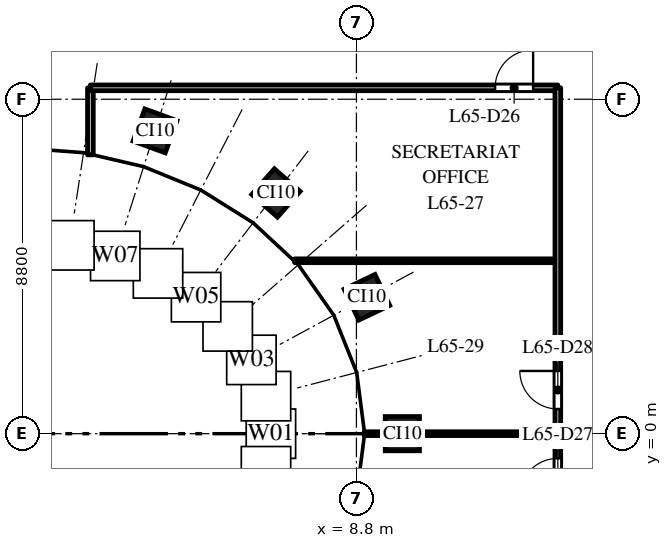
"""IFC4 building model, lengths in metres.
Left out: names, types, materials, properties, quantities, classifications, styles, units other than length and angle.
Written with IfcOpenShell. Run it as: python <this file> out.ifc"""

import sys

from ifc_helpers import new_model, si_unit, direction, frame, frame_2d, origin, origin_2d, place, context, subcontext, project, spatial, rectangle, extrude, element, fill, save


model = new_model("IFC4")
c1 = context("Model", 3, precision=1e-05, world=origin(), true_north=direction((0.0, 1.0)))
c2 = subcontext(c1, "Body", "Model", "MODEL_VIEW")
j1 = project(units=[si_unit("LENGTHUNIT", "METRE"), si_unit("PLANEANGLEUNIT", "RADIAN")], contexts=[c1])
p1 = place(None, origin())
s1 = spatial("IfcSite", under=j1, at=p1, CompositionType="ELEMENT")
p2 = place(p1, origin())
s2 = spatial("IfcBuilding", under=s1, at=p2, CompositionType="ELEMENT")
p3 = place(p2, frame((0.0, 0.0, 303.0)))
s3 = spatial("IfcBuildingStorey", under=s2, at=p3, CompositionType="ELEMENT", Elevation=303.0)
for number, where, z_axis, x_axis in (
    (1, (10.008, 0.0, 0.0), (0.0, 0.0, 1.0), (0.0, 1.0, 0.0)),
    (2, (9.076, 3.588, 0.0), (0.0, 0.0, 1.0), (-0.429, 0.903, 0.0)),
    (3, (6.682, 6.334, 0.0), (0.0, 0.0, 1.0), (-0.751, 0.66, 0.0)),
    (4, (3.501, 7.967, 0.0), (0.0, 0.0, 1.0), (-0.939, 0.344, 0.0)),
):
    element("IfcColumn", number, at=place(p3, frame(where, z_axis=z_axis, x_axis=x_axis)), inside=s3, PredefinedType="COLUMN", context=c2, shape_type="SweptSolid", body=[
        extrude(rectangle(XDim=0.9, YDim=0.9, at=origin_2d()), origin(), (0.0, 0.0, 1.0), 4.0),
    ])
p4 = place(p3, frame((1.8, 7.336, 0.0), z_axis=(0.0, 0.0, 1.0), x_axis=(0.0, 1.0, 0.0)))
e5 = element("IfcWall", 5, at=p4, inside=s3, PredefinedType="PARTITIONING", context=c2, shape_type="SweptSolid", body=[
    extrude(rectangle(XDim=1.764, YDim=0.15, at=frame_2d((0.882, 0.0))), origin(), (0.0, 0.0, 1.0), 3.0),
])
p5 = place(p3, frame((1.8, 9.1, 0.0), z_axis=(0.0, 0.0, 1.0), x_axis=(1.0, 0.0, 0.0)))
e6 = element("IfcWall", 6, at=p5, inside=s3, PredefinedType="PARTITIONING", context=c2, shape_type="SweptSolid", body=[
    extrude(rectangle(XDim=12.3, YDim=0.15, at=frame_2d((6.15, 0.0))), origin(), (0.0, 0.0, 1.0), 2.85),
])
p6 = place(p5, frame((10.65, 0.0, 0.0)))
e7 = element("IfcOpeningElement", 7, at=p6, cuts=e6, PredefinedType="OPENING", context=c2, shape_type="SweptSolid", body=[
    extrude(rectangle(XDim=1.0, YDim=2.1, at=frame_2d((0.5, 1.05))), frame((0.0, 0.085, 0.0), z_axis=(0.0, -1.0, 0.0), x_axis=(1.0, 0.0, 0.0)), (0.0, 0.0, 1.0), 0.17),
])
p7 = place(p3, frame((7.174, 4.55, 0.0), z_axis=(0.0, 0.0, 1.0), x_axis=(1.0, 0.0, 0.0)))
e8 = element("IfcWall", 8, at=p7, inside=s3, PredefinedType="PARTITIONING", context=c2, shape_type="SweptSolid", body=[
    extrude(rectangle(XDim=6.851, YDim=0.1, at=frame_2d((3.425, 0.0))), origin(), (0.0, 0.0, 1.0), 2.75),
])
p8 = place(p3, frame((9.005, 0.0, 0.0), z_axis=(0.0, 0.0, 1.0), x_axis=(1.0, 0.0, 0.0)))
e9 = element("IfcWall", 9, at=p8, inside=s3, PredefinedType="PARTITIONING", context=c2, shape_type="SweptSolid", body=[
    extrude(rectangle(XDim=5.02, YDim=0.1, at=frame_2d((2.51, 0.0))), origin(), (0.0, 0.0, 1.0), 3.7),
])
p9 = place(p3, frame((14.1, -9.1, 0.0), z_axis=(0.0, 0.0, 1.0), x_axis=(0.0, 1.0, 0.0)))
e10 = element("IfcWall", 10, at=p9, inside=s3, PredefinedType="PARTITIONING", context=c2, shape_type="SweptSolid", body=[
    extrude(rectangle(XDim=18.2, YDim=0.15, at=frame_2d((9.1, 0.0))), origin(), (0.0, 0.0, 1.0), 2.75),
])
p10 = place(p9, frame((7.45, 0.0, 0.0)))
e11 = element("IfcOpeningElement", 11, at=p10, cuts=e10, PredefinedType="OPENING", context=c2, shape_type="SweptSolid", body=[
    extrude(rectangle(XDim=1.0, YDim=2.1, at=frame_2d((0.5, 1.05))), frame((0.0, 0.085, 0.0), z_axis=(0.0, -1.0, 0.0), x_axis=(1.0, 0.0, 0.0)), (0.0, 0.0, 1.0), 0.17),
])
p11 = place(p9, frame((9.75, 0.0, 0.0)))
e12 = element("IfcOpeningElement", 12, at=p11, cuts=e10, PredefinedType="OPENING", context=c2, shape_type="SweptSolid", body=[
    extrude(rectangle(XDim=1.0, YDim=2.1, at=frame_2d((0.5, 1.05))), frame((0.0, 0.085, 0.0), z_axis=(0.0, -1.0, 0.0), x_axis=(1.0, 0.0, 0.0)), (0.0, 0.0, 1.0), 0.17),
])
p12 = place(p6, origin())
e13 = element("IfcDoor", 13, at=p12, inside=s3, OperationType="SINGLE_SWING_RIGHT", PredefinedType="DOOR", context=c2, shape_type="SweptSolid", body=[
    extrude(rectangle(XDim=1.0, YDim=2.1, at=frame_2d((0.5, 1.05))), frame((0.0, 0.025, 0.0), z_axis=(0.0, -1.0, 0.0), x_axis=(1.0, 0.0, 0.0)), (0.0, 0.0, 1.0), 0.05),
])
fill(e7, e13)
p13 = place(p10, origin())
e14 = element("IfcDoor", 14, at=p13, inside=s3, OperationType="SINGLE_SWING_LEFT", PredefinedType="DOOR", context=c2, shape_type="SweptSolid", body=[
    extrude(rectangle(XDim=1.0, YDim=2.1, at=frame_2d((0.5, 1.05))), frame((0.0, 0.025, 0.0), z_axis=(0.0, -1.0, 0.0), x_axis=(1.0, 0.0, 0.0)), (0.0, 0.0, 1.0), 0.05),
])
fill(e11, e14)
p14 = place(p11, origin())
e15 = element("IfcDoor", 15, at=p14, inside=s3, OperationType="SINGLE_SWING_RIGHT", PredefinedType="DOOR", context=c2, shape_type="SweptSolid", body=[
    extrude(rectangle(XDim=1.0, YDim=2.1, at=frame_2d((0.5, 1.05))), frame((0.0, 0.025, 0.0), z_axis=(0.0, -1.0, 0.0), x_axis=(1.0, 0.0, 0.0)), (0.0, 0.0, 1.0), 0.05),
])
fill(e12, e15)
save(model, sys.argv[1])
